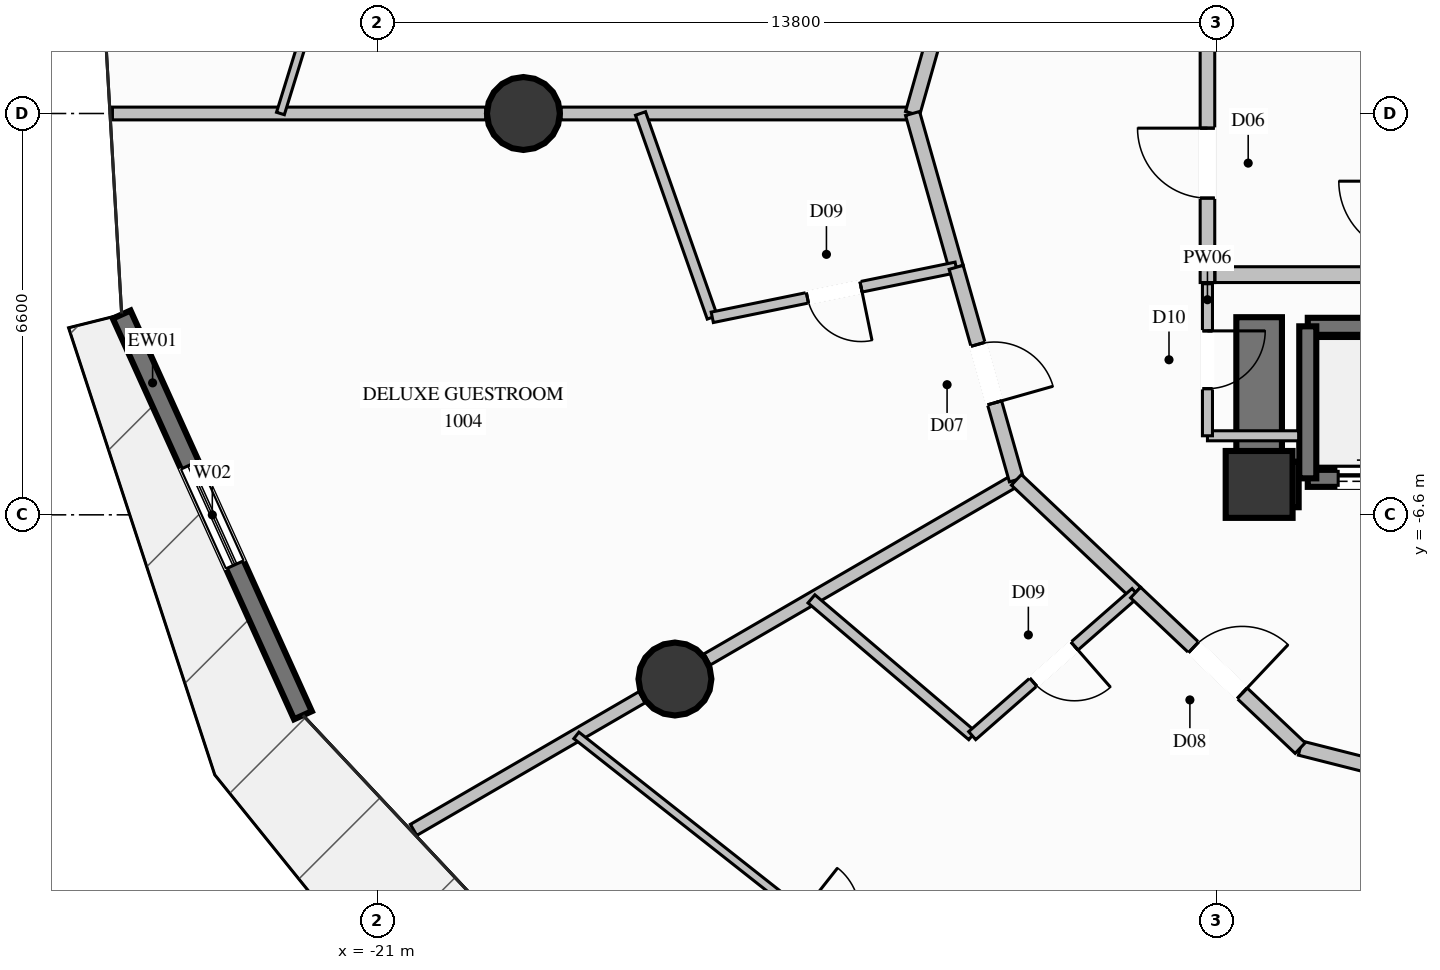
"""IFC4 building model, lengths in metres.
Left out: names, types, materials, properties, quantities, classifications, styles, units other than length and angle.
Written with IfcOpenShell. Run it as: python <this file> out.ifc"""

import sys

from ifc_helpers import new_model, si_unit, direction, frame, frame_2d, origin, origin_2d, place, context, subcontext, project, spatial, rectangle, circle, extrude, element, fill, save


model = new_model("IFC4")
c1 = context("Model", 3, precision=1e-05, world=origin(), true_north=direction((0.0, 1.0)))
c2 = subcontext(c1, "Body", "Model", "MODEL_VIEW")
j1 = project(units=[si_unit("LENGTHUNIT", "METRE"), si_unit("PLANEANGLEUNIT", "RADIAN")], contexts=[c1])
p1 = place(None, origin())
s1 = spatial("IfcSite", under=j1, at=p1, CompositionType="ELEMENT")
p2 = place(p1, origin())
s2 = spatial("IfcBuilding", under=s1, at=p2, CompositionType="ELEMENT")
p3 = place(p2, frame((0.0, 0.0, 39.2)))
s3 = spatial("IfcBuildingStorey", under=s2, at=p3, CompositionType="ELEMENT", Elevation=39.2)
p4 = place(p3, frame((-6.5, -6.1, 0.0), z_axis=(0.0, 0.0, 1.0), x_axis=(1.0, 0.0, 0.0)))
e1 = element("IfcColumn", 1, at=p4, inside=s3, PredefinedType="COLUMN", context=c2, shape_type="SweptSolid", body=[
    extrude(rectangle(XDim=1.1, YDim=1.1, at=origin_2d()), origin(), (0.0, 0.0, 1.0), 3.6),
])
p5 = place(p3, frame((-6.125, -6.1, 0.0), z_axis=(0.0, 0.0, 1.0), x_axis=(1.0, 0.0, 0.0)))
e2 = element("IfcWall", 2, at=p5, inside=s3, PredefinedType="SHEAR", context=c2, shape_type="SweptSolid", body=[
    extrude(rectangle(XDim=0.275, YDim=0.75, at=frame_2d((0.137, 0.0))), origin(), (0.0, 0.0, 1.0), 3.6),
])
p6 = place(p3, frame((-6.5, -6.475, 0.0), z_axis=(0.0, 0.0, 1.0), x_axis=(0.0, 1.0, 0.0)))
e3 = element("IfcWall", 3, at=p6, inside=s3, PredefinedType="SHEAR", context=c2, shape_type="SweptSolid", body=[
    extrude(rectangle(XDim=3.125, YDim=0.75, at=frame_2d((1.562, 0.0))), origin(), (0.0, 0.0, 1.0), 3.6),
])
for number, where, z_axis, x_axis in (
    (4, (-18.6, 0.0, 0.0), (0.0, 0.0, 1.0), (1.0, 0.0, 0.0)),
    (5, (-16.108, -9.3, 0.0), (0.0, 0.0, 1.0), (1.0, 0.0, 0.0)),
):
    element("IfcColumn", number, at=place(p3, frame(where, z_axis=z_axis, x_axis=x_axis)), inside=s3, PredefinedType="COLUMN", context=c2, shape_type="SweptSolid", body=[
        extrude(circle(Radius=0.6, at=origin_2d()), origin(), (0.0, 0.0, 1.0), 3.6),
    ])
p7 = place(p3, frame((-22.226, -9.896, 0.0), z_axis=(0.0, 0.0, 1.0), x_axis=(-0.412136514118, 0.911122106927, 0.0)))
e6 = element("IfcWall", 6, at=p7, inside=s3, PredefinedType="SOLIDWALL", context=c2, shape_type="SweptSolid", body=[
    extrude(rectangle(XDim=7.233, YDim=0.32, at=frame_2d((3.616, 0.0))), origin(), (0.0, 0.0, 1.0), 3.34),
])
p8 = place(p7, frame((2.716, 0.0, 0.35)))
e7 = element("IfcOpeningElement", 7, at=p8, cuts=e6, PredefinedType="OPENING", context=c2, shape_type="SweptSolid", body=[
    extrude(rectangle(XDim=1.8, YDim=2.6, at=frame_2d((0.9, 1.3))), frame((0.0, 0.17, 0.0), z_axis=(0.0, -1.0, 0.0), x_axis=(1.0, 0.0, 0.0)), (0.0, 0.0, 1.0), 0.34),
])
p9 = place(p3, frame((-5.7, -6.0, 0.0), z_axis=(0.0, 0.0, 1.0), x_axis=(1.0, 0.0, 0.0)))
e8 = element("IfcWall", 8, at=p9, inside=s3, PredefinedType="SOLIDWALL", context=c2, shape_type="SweptSolid", body=[
    extrude(rectangle(XDim=2.1, YDim=0.28, at=frame_2d((1.05, 0.0))), origin(), (0.0, 0.0, 1.0), 3.34),
])
p10 = place(p9, frame((0.5, 0.0, 0.0)))
e9 = element("IfcOpeningElement", 9, at=p10, cuts=e8, PredefinedType="OPENING", context=c2, shape_type="SweptSolid", body=[
    extrude(rectangle(XDim=1.1, YDim=2.2, at=frame_2d((0.55, 1.1))), frame((0.0, 0.15, 0.0), z_axis=(0.0, -1.0, 0.0), x_axis=(1.0, 0.0, 0.0)), (0.0, 0.0, 1.0), 0.3),
])
p11 = place(p3, frame((-3.6, -3.5, 0.0), z_axis=(0.0, 0.0, 1.0), x_axis=(-1.0, 0.0, 0.0)))
e10 = element("IfcWall", 10, at=p11, inside=s3, PredefinedType="SOLIDWALL", context=c2, shape_type="SweptSolid", body=[
    extrude(rectangle(XDim=2.1, YDim=0.28, at=frame_2d((1.05, 0.0))), origin(), (0.0, 0.0, 1.0), 3.34),
])
p12 = place(p3, frame((-5.7, -3.5, 0.0), z_axis=(0.0, 0.0, 1.0), x_axis=(0.0, -1.0, 0.0)))
e11 = element("IfcWall", 11, at=p12, inside=s3, PredefinedType="SOLIDWALL", context=c2, shape_type="SweptSolid", body=[
    extrude(rectangle(XDim=2.5, YDim=0.28, at=frame_2d((1.25, 0.0))), origin(), (0.0, 0.0, 1.0), 3.34),
])
p13 = place(p3, frame((-7.35, -2.78, 0.0), z_axis=(0.0, 0.0, 1.0), x_axis=(0.0, 1.0, 0.0)))
e12 = element("IfcWall", 12, at=p13, inside=s3, PredefinedType="PARTITIONING", context=c2, shape_type="SweptSolid", body=[
    extrude(rectangle(XDim=5.12, YDim=0.24, at=frame_2d((2.56, 0.0))), origin(), (0.0, 0.0, 1.0), 2.425),
])
p14 = place(p13, frame((1.389, 0.0, 0.0)))
e13 = element("IfcOpeningElement", 13, at=p14, cuts=e12, PredefinedType="OPENING", context=c2, shape_type="SweptSolid", body=[
    extrude(rectangle(XDim=1.15, YDim=2.2, at=frame_2d((0.575, 1.1))), frame((0.0, 0.13, 0.0), z_axis=(0.0, -1.0, 0.0), x_axis=(1.0, 0.0, 0.0)), (0.0, 0.0, 1.0), 0.26),
])
p15 = place(p3, frame((-7.225, -2.65, 0.0), z_axis=(0.0, 0.0, 1.0), x_axis=(1.0, 0.0, 0.0)))
e14 = element("IfcWall", 14, at=p15, inside=s3, PredefinedType="PARTITIONING", context=c2, shape_type="SweptSolid", body=[
    extrude(rectangle(XDim=3.095, YDim=0.26, at=frame_2d((1.548, 0.0))), origin(), (0.0, 0.0, 1.0), 3.34),
])
p16 = place(p3, frame((-7.35, -5.3, 0.0), z_axis=(0.0, 0.0, 1.0), x_axis=(1.0, 0.0, 0.0)))
e15 = element("IfcWall", 15, at=p16, inside=s3, PredefinedType="PARTITIONING", context=c2, shape_type="SweptSolid", body=[
    extrude(rectangle(XDim=1.5, YDim=0.165, at=frame_2d((0.75, 0.0))), origin(), (0.0, 0.0, 1.0), 2.425),
])
p17 = place(p3, frame((-7.35, -2.8, 0.0), z_axis=(0.0, 0.0, 1.0), x_axis=(0.0, -1.0, 0.0)))
e16 = element("IfcWall", 16, at=p17, inside=s3, PredefinedType="PARTITIONING", context=c2, shape_type="SweptSolid", body=[
    extrude(rectangle(XDim=2.5, YDim=0.165, at=frame_2d((1.25, 0.0))), origin(), (0.0, 0.0, 1.0), 3.34),
])
p18 = place(p17, frame((0.775, 0.0, 0.0)))
e17 = element("IfcOpeningElement", 17, at=p18, cuts=e16, PredefinedType="OPENING", context=c2, shape_type="SweptSolid", body=[
    extrude(rectangle(XDim=0.95, YDim=2.1, at=frame_2d((0.475, 1.05))), frame((0.0, 0.093, 0.0), z_axis=(0.0, -1.0, 0.0), x_axis=(1.0, 0.0, 0.0)), (0.0, 0.0, 1.0), 0.185),
])
p19 = place(p3, frame((-12.2, 0.0, 0.0), z_axis=(0.0, 0.0, 1.0), x_axis=(-1.0, 0.0, 0.0)))
e18 = element("IfcWall", 18, at=p19, inside=s3, PredefinedType="PARTITIONING", context=c2, shape_type="SweptSolid", body=[
    extrude(rectangle(XDim=5.78, YDim=0.21, at=frame_2d((2.89, 0.0))), origin(), (0.0, 0.0, 1.0), 2.709),
])
p20 = place(p3, frame((-19.22, 0.0, 0.0), z_axis=(0.0, 0.0, 1.0), x_axis=(-1.0, 0.0, 0.0)))
e19 = element("IfcWall", 19, at=p20, inside=s3, PredefinedType="PARTITIONING", context=c2, shape_type="SweptSolid", body=[
    extrude(rectangle(XDim=6.139, YDim=0.21, at=frame_2d((3.069, 0.0))), origin(), (0.0, 0.0, 1.0), 3.34),
])
p21 = place(p3, frame((-10.492, -6.025, 0.0), z_axis=(0.0, 0.0, 1.0), x_axis=(-0.86478894661, -0.502135517387, 0.0)))
e20 = element("IfcWall", 20, at=p21, inside=s3, PredefinedType="PARTITIONING", context=c2, shape_type="SweptSolid", body=[
    extrude(rectangle(XDim=5.881, YDim=0.21, at=frame_2d((2.94, 0.0))), origin(), (0.0, 0.0, 1.0), 2.709),
])
p22 = place(p3, frame((-16.65, -9.6, 0.0), z_axis=(0.0, 0.0, 1.0), x_axis=(-0.864794458223, -0.502126025044, 0.0)))
e21 = element("IfcWall", 21, at=p22, inside=s3, PredefinedType="PARTITIONING", context=c2, shape_type="SweptSolid", body=[
    extrude(rectangle(XDim=4.343, YDim=0.21, at=frame_2d((2.172, 0.0))), origin(), (0.0, 0.0, 1.0), 3.34),
])
p23 = place(p3, frame((-10.492, 6.025, 0.0), z_axis=(0.0, 0.0, 1.0), x_axis=(-0.272743314702, -0.962086838225, 0.0)))
e22 = element("IfcWall", 22, at=p23, inside=s3, PredefinedType="PARTITIONING", context=c2, shape_type="SweptSolid", body=[
    extrude(rectangle(XDim=6.262, YDim=0.24, at=frame_2d((3.131, 0.0))), origin(), (0.0, 0.0, 1.0), 3.34),
])
p24 = place(p3, frame((-19.175, 11.064, 0.0), z_axis=(0.0, 0.0, 1.0), x_axis=(-0.295395137922, -0.955375168451, 0.0)))
e23 = element("IfcWall", 23, at=p24, inside=s3, PredefinedType="PARTITIONING", context=c2, shape_type="SweptSolid", body=[
    extrude(rectangle(XDim=11.581, YDim=0.135, at=frame_2d((5.791, 0.0))), origin(), (0.0, 0.0, 1.0), 3.34),
])
p25 = place(p24, frame((5.315, 0.0, 0.0)))
e24 = element("IfcOpeningElement", 24, at=p25, cuts=e23, PredefinedType="OPENING", context=c2, shape_type="SweptSolid", body=[
    extrude(rectangle(XDim=0.95, YDim=2.1, at=frame_2d((0.475, 1.05))), frame((0.0, 0.078, 0.0), z_axis=(0.0, -1.0, 0.0), x_axis=(1.0, 0.0, 0.0)), (0.0, 0.0, 1.0), 0.155),
])
p26 = place(p3, frame((-12.2, 0.0, 0.0), z_axis=(0.0, 0.0, 1.0), x_axis=(0.272672757197, -0.962106837873, 0.0)))
e25 = element("IfcWall", 25, at=p26, inside=s3, PredefinedType="PARTITIONING", context=c2, shape_type="SweptSolid", body=[
    extrude(rectangle(XDim=2.63, YDim=0.24, at=frame_2d((1.315, 0.0))), origin(), (0.0, 0.0, 1.0), 3.34),
])
p27 = place(p3, frame((-16.674, 0.0, 0.0), z_axis=(0.0, 0.0, 1.0), x_axis=(0.332094128013, -0.94324625106, 0.0)))
e26 = element("IfcWall", 26, at=p27, inside=s3, PredefinedType="PLUMBINGWALL", context=c2, shape_type="SweptSolid", body=[
    extrude(rectangle(XDim=3.554, YDim=0.175, at=frame_2d((1.777, 0.0))), origin(), (0.0, 0.0, 1.0), 3.34),
])
p28 = place(p3, frame((-11.483, -2.53, 0.0), z_axis=(0.0, 0.0, 1.0), x_axis=(-0.979638499871, -0.200769543433, 0.0)))
e27 = element("IfcWall", 27, at=p28, inside=s3, PredefinedType="PLUMBINGWALL", context=c2, shape_type="SweptSolid", body=[
    extrude(rectangle(XDim=4.094, YDim=0.175, at=frame_2d((2.047, 0.0))), origin(), (0.0, 0.0, 1.0), 3.34),
])
p29 = place(p28, frame((1.597, 0.0, 0.0)))
e28 = element("IfcOpeningElement", 28, at=p29, cuts=e27, PredefinedType="OPENING", context=c2, shape_type="SweptSolid", body=[
    extrude(rectangle(XDim=0.9, YDim=2.1, at=frame_2d((0.45, 1.05))), frame((0.0, 0.098, 0.0), z_axis=(0.0, -1.0, 0.0), x_axis=(1.0, 0.0, 0.0)), (0.0, 0.0, 1.0), 0.195),
])
p30 = place(p3, frame((-11.483, -2.53, 0.0), z_axis=(0.0, 0.0, 1.0), x_axis=(0.272794390365, -0.96207235725, 0.0)))
e29 = element("IfcWall", 29, at=p30, inside=s3, PredefinedType="PARTITIONING", context=c2, shape_type="SweptSolid", body=[
    extrude(rectangle(XDim=3.633, YDim=0.24, at=frame_2d((1.816, 0.0))), origin(), (0.0, 0.0, 1.0), 3.34),
])
p31 = place(p30, frame((1.316, 0.0, 0.0)))
e30 = element("IfcOpeningElement", 30, at=p31, cuts=e29, PredefinedType="OPENING", context=c2, shape_type="SweptSolid", body=[
    extrude(rectangle(XDim=1.0, YDim=2.2, at=frame_2d((0.5, 1.1))), frame((0.0, 0.13, 0.0), z_axis=(0.0, -1.0, 0.0), x_axis=(1.0, 0.0, 0.0)), (0.0, 0.0, 1.0), 0.26),
])
p32 = place(p3, frame((-10.492, -6.025, 0.0), z_axis=(0.0, 0.0, 1.0), x_axis=(0.726651583854, -0.687006168591, 0.0)))
e31 = element("IfcWall", 31, at=p32, inside=s3, PredefinedType="PARTITIONING", context=c2, shape_type="SweptSolid", body=[
    extrude(rectangle(XDim=2.697, YDim=0.24, at=frame_2d((1.349, 0.0))), origin(), (0.0, 0.0, 1.0), 3.34),
])
p33 = place(p3, frame((-13.863, -7.982, 0.0), z_axis=(0.0, 0.0, 1.0), x_axis=(0.761713672962, -0.647913790888, 0.0)))
e32 = element("IfcWall", 32, at=p33, inside=s3, PredefinedType="PLUMBINGWALL", context=c2, shape_type="SweptSolid", body=[
    extrude(rectangle(XDim=3.471, YDim=0.175, at=frame_2d((1.736, 0.0))), origin(), (0.0, 0.0, 1.0), 3.34),
])
p34 = place(p3, frame((-8.532, -7.878, 0.0), z_axis=(0.0, 0.0, 1.0), x_axis=(-0.752314103663, -0.658804591233, 0.0)))
e33 = element("IfcWall", 33, at=p34, inside=s3, PredefinedType="PLUMBINGWALL", context=c2, shape_type="SweptSolid", body=[
    extrude(rectangle(XDim=3.572, YDim=0.175, at=frame_2d((1.786, 0.0))), origin(), (0.0, 0.0, 1.0), 3.34),
])
p35 = place(p34, frame((1.336, 0.0, 0.0)))
e34 = element("IfcOpeningElement", 34, at=p35, cuts=e33, PredefinedType="OPENING", context=c2, shape_type="SweptSolid", body=[
    extrude(rectangle(XDim=0.9, YDim=2.1, at=frame_2d((0.45, 1.05))), frame((0.0, 0.098, 0.0), z_axis=(0.0, -1.0, 0.0), x_axis=(1.0, 0.0, 0.0)), (0.0, 0.0, 1.0), 0.195),
])
p36 = place(p3, frame((-5.825, -10.436, 0.0), z_axis=(0.0, 0.0, 1.0), x_axis=(0.969413132073, -0.245434674331, 0.0)))
e35 = element("IfcWall", 35, at=p36, inside=s3, PredefinedType="PARTITIONING", context=c2, shape_type="SweptSolid", body=[
    extrude(rectangle(XDim=6.576, YDim=0.24, at=frame_2d((3.288, 0.0))), origin(), (0.0, 0.0, 1.0), 3.34),
])
p37 = place(p3, frame((-8.532, -7.878, 0.0), z_axis=(0.0, 0.0, 1.0), x_axis=(0.726816794063, -0.686831382413, 0.0)))
e36 = element("IfcWall", 36, at=p37, inside=s3, PredefinedType="PARTITIONING", context=c2, shape_type="SweptSolid", body=[
    extrude(rectangle(XDim=3.725, YDim=0.24, at=frame_2d((1.862, 0.0))), origin(), (0.0, 0.0, 1.0), 3.34),
])
p38 = place(p37, frame((1.312, 0.0, 0.0)))
e37 = element("IfcOpeningElement", 37, at=p38, cuts=e36, PredefinedType="OPENING", context=c2, shape_type="SweptSolid", body=[
    extrude(rectangle(XDim=1.1, YDim=2.3, at=frame_2d((0.55, 1.15))), frame((0.0, 0.13, 0.0), z_axis=(0.0, -1.0, 0.0), x_axis=(1.0, 0.0, 0.0)), (0.0, 0.0, 1.0), 0.26),
])
p39 = place(p3, frame((-17.729, -10.227, 0.0), z_axis=(0.0, 0.0, 1.0), x_axis=(0.785062483649, -0.61941657773, 0.0)))
e38 = element("IfcWall", 38, at=p39, inside=s3, PredefinedType="PARTITIONING", context=c2, shape_type="SweptSolid", body=[
    extrude(rectangle(XDim=10.395, YDim=0.135, at=frame_2d((5.198, 0.0))), origin(), (0.0, 0.0, 1.0), 2.792),
])
p40 = place(p39, frame((4.723, 0.0, 0.0)))
e39 = element("IfcOpeningElement", 39, at=p40, cuts=e38, PredefinedType="OPENING", context=c2, shape_type="SweptSolid", body=[
    extrude(rectangle(XDim=0.95, YDim=2.1, at=frame_2d((0.475, 1.05))), frame((0.0, 0.078, 0.0), z_axis=(0.0, -1.0, 0.0), x_axis=(1.0, 0.0, 0.0)), (0.0, 0.0, 1.0), 0.155),
])
p41 = place(p8, origin())
e40 = element("IfcWindow", 40, at=p41, inside=s3, PartitioningType="SINGLE_PANEL", PredefinedType="WINDOW", context=c2, shape_type="SweptSolid", body=[
    extrude(rectangle(XDim=1.8, YDim=2.6, at=frame_2d((0.9, 1.3))), frame((0.0, 0.03, 0.0), z_axis=(0.0, -1.0, 0.0), x_axis=(1.0, 0.0, 0.0)), (0.0, 0.0, 1.0), 0.06),
])
fill(e7, e40)
p42 = place(p10, origin())
e41 = element("IfcDoor", 41, at=p42, inside=s3, OperationType="SLIDING_TO_LEFT", PredefinedType="DOOR", context=c2, shape_type="SweptSolid", body=[
    extrude(rectangle(XDim=1.1, YDim=2.2, at=frame_2d((0.55, 1.1))), frame((0.0, 0.025, 0.0), z_axis=(0.0, -1.0, 0.0), x_axis=(1.0, 0.0, 0.0)), (0.0, 0.0, 1.0), 0.05),
])
fill(e9, e41)
p43 = place(p14, origin())
e42 = element("IfcDoor", 42, at=p43, inside=s3, OperationType="SINGLE_SWING_RIGHT", PredefinedType="DOOR", context=c2, shape_type="SweptSolid", body=[
    extrude(rectangle(XDim=1.15, YDim=2.2, at=frame_2d((0.575, 1.1))), frame((0.0, 0.025, 0.0), z_axis=(0.0, -1.0, 0.0), x_axis=(1.0, 0.0, 0.0)), (0.0, 0.0, 1.0), 0.05),
])
fill(e13, e42)
p44 = place(p18, origin())
e43 = element("IfcDoor", 43, at=p44, inside=s3, OperationType="SINGLE_SWING_LEFT", PredefinedType="DOOR", context=c2, shape_type="SweptSolid", body=[
    extrude(rectangle(XDim=0.95, YDim=2.1, at=frame_2d((0.475, 1.05))), frame((0.0, 0.025, 0.0), z_axis=(0.0, -1.0, 0.0), x_axis=(1.0, 0.0, 0.0)), (0.0, 0.0, 1.0), 0.05),
])
fill(e17, e43)
p45 = place(p29, origin())
e44 = element("IfcDoor", 44, at=p45, inside=s3, OperationType="SINGLE_SWING_LEFT", PredefinedType="DOOR", context=c2, shape_type="SweptSolid", body=[
    extrude(rectangle(XDim=0.9, YDim=2.1, at=frame_2d((0.45, 1.05))), frame((0.0, 0.025, 0.0), z_axis=(0.0, -1.0, 0.0), x_axis=(1.0, 0.0, 0.0)), (0.0, 0.0, 1.0), 0.05),
])
fill(e28, e44)
p46 = place(p31, origin())
e45 = element("IfcDoor", 45, at=p46, inside=s3, OperationType="SINGLE_SWING_RIGHT", PredefinedType="DOOR", context=c2, shape_type="SweptSolid", body=[
    extrude(rectangle(XDim=1.0, YDim=2.2, at=frame_2d((0.5, 1.1))), frame((0.0, 0.025, 0.0), z_axis=(0.0, -1.0, 0.0), x_axis=(1.0, 0.0, 0.0)), (0.0, 0.0, 1.0), 0.05),
])
fill(e30, e45)
p47 = place(p35, origin())
e46 = element("IfcDoor", 46, at=p47, inside=s3, OperationType="SINGLE_SWING_LEFT", PredefinedType="DOOR", context=c2, shape_type="SweptSolid", body=[
    extrude(rectangle(XDim=0.9, YDim=2.1, at=frame_2d((0.45, 1.05))), frame((0.0, 0.025, 0.0), z_axis=(0.0, -1.0, 0.0), x_axis=(1.0, 0.0, 0.0)), (0.0, 0.0, 1.0), 0.05),
])
fill(e34, e46)
p48 = place(p38, origin())
e47 = element("IfcDoor", 47, at=p48, inside=s3, OperationType="SINGLE_SWING_RIGHT", PredefinedType="DOOR", context=c2, shape_type="SweptSolid", body=[
    extrude(rectangle(XDim=1.1, YDim=2.3, at=frame_2d((0.55, 1.15))), frame((0.0, 0.025, 0.0), z_axis=(0.0, -1.0, 0.0), x_axis=(1.0, 0.0, 0.0)), (0.0, 0.0, 1.0), 0.05),
])
fill(e37, e47)
save(model, sys.argv[1])
